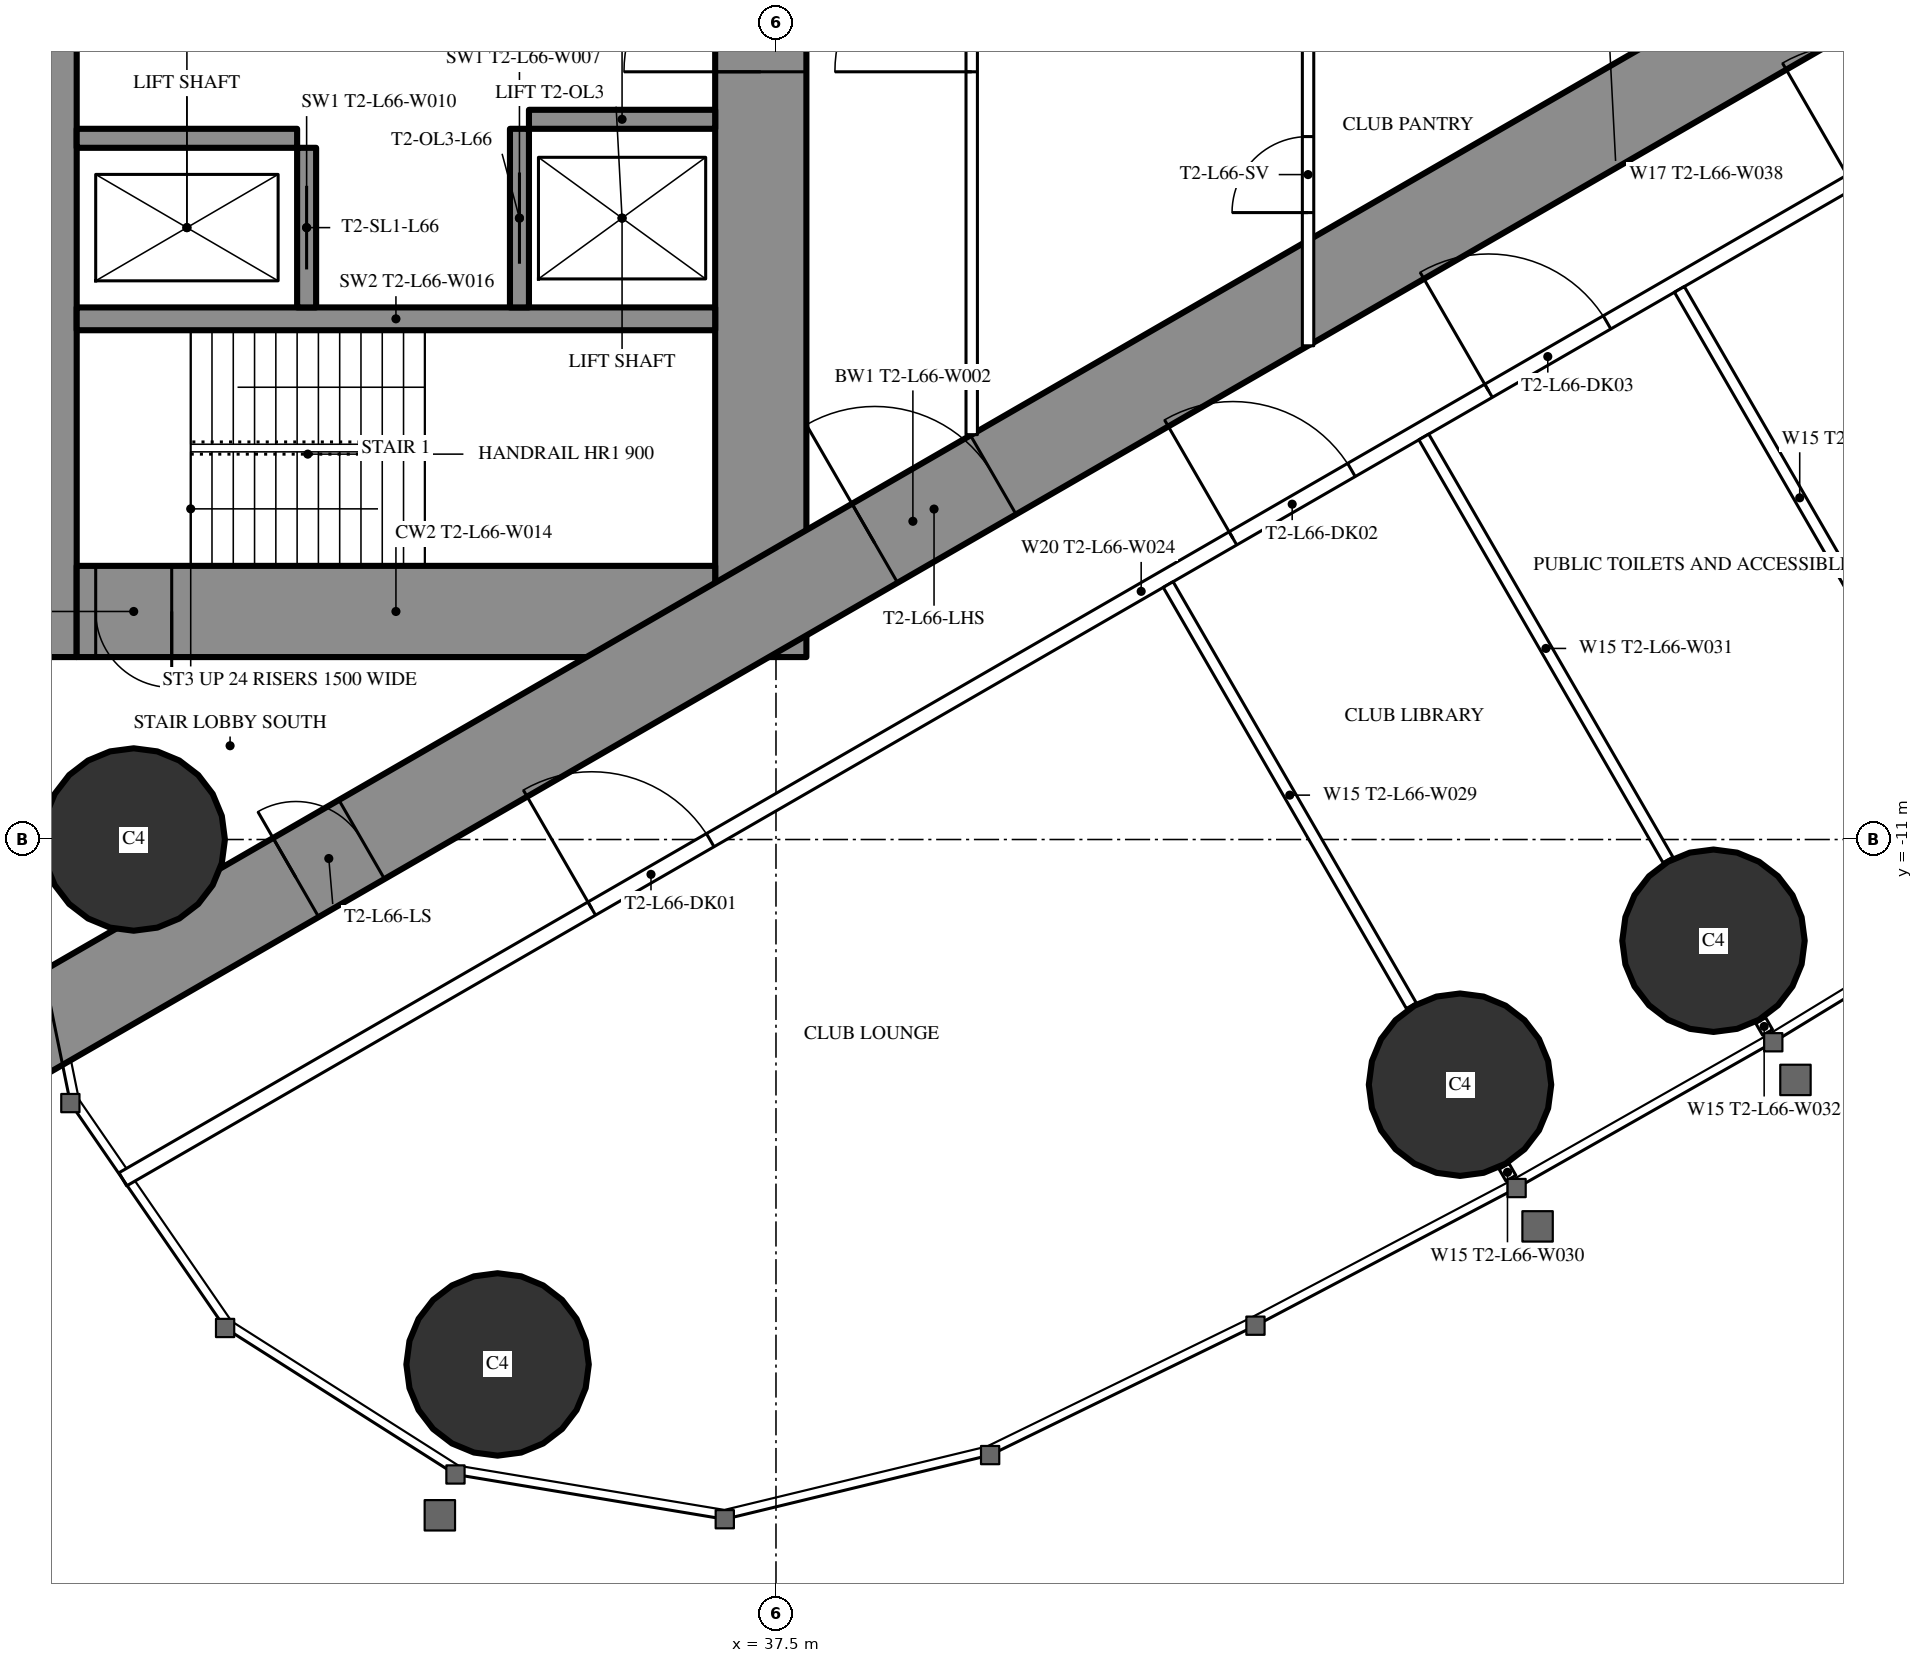
"""IFC4 building model, lengths in metres.
Left out: names, types, materials, properties, quantities, classifications, styles, units other than length and angle.
Written with IfcOpenShell. Run it as: python <this file> out.ifc"""

import sys

from ifc_helpers import new_model, si_unit, direction, frame, frame_2d, origin, origin_2d, place, context, subcontext, project, spatial, rectangle, circle, extrude, element, fill, save


model = new_model("IFC4")
c1 = context("Model", 3, precision=1e-05, world=origin(), true_north=direction((0.0, 1.0)))
c2 = subcontext(c1, "Body", "Model", "MODEL_VIEW")
j1 = project(units=[si_unit("LENGTHUNIT", "METRE"), si_unit("PLANEANGLEUNIT", "RADIAN")], contexts=[c1])
p1 = place(None, origin())
s1 = spatial("IfcSite", under=j1, at=p1, CompositionType="ELEMENT")
p2 = place(p1, origin())
s2 = spatial("IfcBuilding", under=s1, at=p2, CompositionType="ELEMENT")
p3 = place(p2, frame((0.0, 0.0, 247.7)))
s3 = spatial("IfcBuildingStorey", under=s2, at=p3, CompositionType="ELEMENT", Elevation=247.7)
for number, where, z_axis, x_axis in (
    (1, (33.837, -17.906, 0.0), (0.0, 0.0, 1.0), (1.0, 0.0, 0.0)),
    (2, (29.05, -11.0, 0.0), (0.0, 0.0, 1.0), (1.0, 0.0, 0.0)),
    (3, (46.499, -14.226, 0.0), (0.0, 0.0, 1.0), (1.0, 0.0, 0.0)),
    (4, (49.834, -12.332, 0.0), (0.0, 0.0, 1.0), (1.0, 0.0, 0.0)),
):
    element("IfcColumn", number, at=place(p3, frame(where, z_axis=z_axis, x_axis=x_axis)), inside=s3, PredefinedType="COLUMN", context=c2, shape_type="SweptSolid", body=[
        extrude(circle(Radius=1.2, at=origin_2d()), origin(), (0.0, 0.0, 1.0), 4.2),
    ])
p4 = place(p3, frame((27.9, -8.6, 0.0), z_axis=(0.0, 0.0, 1.0), x_axis=(0.0, 1.0, 0.0)))
e5 = element("IfcWall", 5, at=p4, inside=s3, PredefinedType="SHEAR", context=c2, shape_type="SweptSolid", body=[
    extrude(rectangle(XDim=17.2, YDim=0.8, at=frame_2d((8.6, 0.0))), origin(), (0.0, 0.0, 1.0), 4.2),
])
p5 = place(p4, frame((9.35, 0.0, 0.0)))
e6 = element("IfcOpeningElement", 6, at=p5, cuts=e5, PredefinedType="OPENING", context=c2, shape_type="SweptSolid", body=[
    extrude(rectangle(XDim=0.9, YDim=2.2, at=frame_2d((0.45, 1.1))), frame((0.0, 0.41, 0.0), z_axis=(0.0, -1.0, 0.0), x_axis=(1.0, 0.0, 0.0)), (0.0, 0.0, 1.0), 0.82),
])
p6 = place(p3, frame((37.3, -8.6, 0.0), z_axis=(0.0, 0.0, 1.0), x_axis=(0.0, 1.0, 0.0)))
e7 = element("IfcWall", 7, at=p6, inside=s3, PredefinedType="SHEAR", context=c2, shape_type="SweptSolid", body=[
    extrude(rectangle(XDim=17.2, YDim=1.2, at=frame_2d((8.6, 0.0))), origin(), (0.0, 0.0, 1.0), 4.2),
])
p7 = place(p6, frame((7.7, 0.0, 0.0)))
e8 = element("IfcOpeningElement", 8, at=p7, cuts=e7, PredefinedType="OPENING", context=c2, shape_type="SweptSolid", body=[
    extrude(rectangle(XDim=1.8, YDim=2.2, at=frame_2d((0.9, 1.1))), frame((0.0, 0.61, 0.0), z_axis=(0.0, -1.0, 0.0), x_axis=(1.0, 0.0, 0.0)), (0.0, 0.0, 1.0), 1.22),
])
p8 = place(p3, frame((28.3, -8.0, 0.0), z_axis=(0.0, 0.0, 1.0), x_axis=(1.0, 0.0, 0.0)))
e9 = element("IfcWall", 9, at=p8, inside=s3, PredefinedType="SHEAR", context=c2, shape_type="SweptSolid", body=[
    extrude(rectangle(XDim=8.4, YDim=1.2, at=frame_2d((4.2, 0.0))), origin(), (0.0, 0.0, 1.0), 4.2),
])
p9 = place(p8, frame((0.25, 0.0, 0.0)))
e10 = element("IfcOpeningElement", 10, at=p9, cuts=e9, PredefinedType="OPENING", context=c2, shape_type="SweptSolid", body=[
    extrude(rectangle(XDim=1.0, YDim=2.2, at=frame_2d((0.5, 1.1))), frame((0.0, 0.61, 0.0), z_axis=(0.0, -1.0, 0.0), x_axis=(1.0, 0.0, 0.0)), (0.0, 0.0, 1.0), 1.22),
])
p10 = place(p3, frame((28.3, -4.15, 0.0), z_axis=(0.0, 0.0, 1.0), x_axis=(1.0, 0.0, 0.0)))
e11 = element("IfcWall", 11, at=p10, inside=s3, PredefinedType="SHEAR", context=c2, shape_type="SweptSolid", body=[
    extrude(rectangle(XDim=8.4, YDim=0.3, at=frame_2d((4.2, 0.0))), origin(), (0.0, 0.0, 1.0), 4.2),
])
p11 = place(p3, frame((31.325, -4.0, 0.0), z_axis=(0.0, 0.0, 1.0), x_axis=(0.0, 1.0, 0.0)))
e12 = element("IfcWall", 12, at=p11, inside=s3, PredefinedType="SHEAR", context=c2, shape_type="SweptSolid", body=[
    extrude(rectangle(XDim=2.1, YDim=0.25, at=frame_2d((1.05, 0.0))), origin(), (0.0, 0.0, 1.0), 4.2),
])
p12 = place(p11, frame((0.5, 0.0, 0.0)))
e13 = element("IfcOpeningElement", 13, at=p12, cuts=e12, PredefinedType="OPENING", context=c2, shape_type="SweptSolid", body=[
    extrude(rectangle(XDim=1.1, YDim=2.2, at=frame_2d((0.55, 1.1))), frame((0.0, 0.135, 0.0), z_axis=(0.0, -1.0, 0.0), x_axis=(1.0, 0.0, 0.0)), (0.0, 0.0, 1.0), 0.27),
])
p13 = place(p3, frame((34.125, -4.0, 0.0), z_axis=(0.0, 0.0, 1.0), x_axis=(0.0, 1.0, 0.0)))
e14 = element("IfcWall", 14, at=p13, inside=s3, PredefinedType="SHEAR", context=c2, shape_type="SweptSolid", body=[
    extrude(rectangle(XDim=2.35, YDim=0.25, at=frame_2d((1.175, 0.0))), origin(), (0.0, 0.0, 1.0), 4.2),
])
p14 = place(p13, frame((0.575, 0.0, 0.0)))
e15 = element("IfcOpeningElement", 15, at=p14, cuts=e14, PredefinedType="OPENING", context=c2, shape_type="SweptSolid", body=[
    extrude(rectangle(XDim=1.2, YDim=2.2, at=frame_2d((0.6, 1.1))), frame((0.0, 0.135, 0.0), z_axis=(0.0, -1.0, 0.0), x_axis=(1.0, 0.0, 0.0)), (0.0, 0.0, 1.0), 0.27),
])
p15 = place(p3, frame((28.3, -1.775, 0.0), z_axis=(0.0, 0.0, 1.0), x_axis=(1.0, 0.0, 0.0)))
e16 = element("IfcWall", 16, at=p15, inside=s3, PredefinedType="SHEAR", context=c2, shape_type="SweptSolid", body=[
    extrude(rectangle(XDim=2.9, YDim=0.25, at=frame_2d((1.45, 0.0))), origin(), (0.0, 0.0, 1.0), 4.2),
])
p16 = place(p3, frame((34.25, -1.525, 0.0), z_axis=(0.0, 0.0, 1.0), x_axis=(1.0, 0.0, 0.0)))
e17 = element("IfcWall", 17, at=p16, inside=s3, PredefinedType="SHEAR", context=c2, shape_type="SweptSolid", body=[
    extrude(rectangle(XDim=2.45, YDim=0.25, at=frame_2d((1.225, 0.0))), origin(), (0.0, 0.0, 1.0), 4.2),
])
p17 = place(p3, frame((27.2, -13.8, 0.0), z_axis=(0.0, 0.0, 1.0), x_axis=(0.866027159892, 0.499996958321, 0.0)))
e18 = element("IfcWall", 18, at=p17, inside=s3, PredefinedType="SHEAR", context=c2, shape_type="SweptSolid", body=[
    extrude(rectangle(XDim=27.947, YDim=1.2, at=frame_2d((13.973, 0.0))), origin(), (0.0, 0.0, 1.0), 4.2),
])
p18 = place(p17, frame((4.6, 0.0, 0.0)))
e19 = element("IfcOpeningElement", 19, at=p18, cuts=e18, PredefinedType="OPENING", context=c2, shape_type="SweptSolid", body=[
    extrude(rectangle(XDim=1.0, YDim=2.2, at=frame_2d((0.5, 1.1))), frame((0.0, 0.61, 0.0), z_axis=(0.0, -1.0, 0.0), x_axis=(1.0, 0.0, 0.0)), (0.0, 0.0, 1.0), 1.22),
])
p19 = place(p17, frame((13.395, 0.0, 0.0)))
e20 = element("IfcOpeningElement", 20, at=p19, cuts=e18, PredefinedType="OPENING", context=c2, shape_type="SweptSolid", body=[
    extrude(rectangle(XDim=1.8, YDim=2.2, at=frame_2d((0.9, 1.1))), frame((0.0, 0.61, 0.0), z_axis=(0.0, -1.0, 0.0), x_axis=(1.0, 0.0, 0.0)), (0.0, 0.0, 1.0), 1.22),
])
p20 = place(p3, frame((28.907, -15.47, 0.0), z_axis=(0.0, 0.0, 1.0), x_axis=(0.866023700353, 0.500002950419, 0.0)))
e21 = element("IfcWall", 21, at=p20, inside=s3, PredefinedType="PARTITIONING", context=c2, shape_type="SweptSolid", body=[
    extrude(rectangle(XDim=30.941, YDim=0.2, at=frame_2d((15.47, 0.0))), origin(), (0.0, 0.0, 1.0), 3.95),
])
p21 = place(p20, frame((7.124, 0.0, 0.0)))
e22 = element("IfcOpeningElement", 22, at=p21, cuts=e21, PredefinedType="OPENING", context=c2, shape_type="SweptSolid", body=[
    extrude(rectangle(XDim=1.8, YDim=2.2, at=frame_2d((0.9, 1.1))), frame((0.0, 0.11, 0.0), z_axis=(0.0, -1.0, 0.0), x_axis=(1.0, 0.0, 0.0)), (0.0, 0.0, 1.0), 0.22),
])
p22 = place(p20, frame((16.865, 0.0, 0.0)))
e23 = element("IfcOpeningElement", 23, at=p22, cuts=e21, PredefinedType="OPENING", context=c2, shape_type="SweptSolid", body=[
    extrude(rectangle(XDim=1.8, YDim=2.2, at=frame_2d((0.9, 1.1))), frame((0.0, 0.11, 0.0), z_axis=(0.0, -1.0, 0.0), x_axis=(1.0, 0.0, 0.0)), (0.0, 0.0, 1.0), 0.22),
])
p23 = place(p20, frame((20.748, 0.0, 0.0)))
e24 = element("IfcOpeningElement", 24, at=p23, cuts=e21, PredefinedType="OPENING", context=c2, shape_type="SweptSolid", body=[
    extrude(rectangle(XDim=1.8, YDim=2.2, at=frame_2d((0.9, 1.1))), frame((0.0, 0.11, 0.0), z_axis=(0.0, -1.0, 0.0), x_axis=(1.0, 0.0, 0.0)), (0.0, 0.0, 1.0), 0.22),
])
p24 = place(p20, frame((26.252, 0.0, 0.0)))
e25 = element("IfcOpeningElement", 25, at=p24, cuts=e21, PredefinedType="OPENING", context=c2, shape_type="SweptSolid", body=[
    extrude(rectangle(XDim=1.8, YDim=2.2, at=frame_2d((0.9, 1.1))), frame((0.0, 0.11, 0.0), z_axis=(0.0, -1.0, 0.0), x_axis=(1.0, 0.0, 0.0)), (0.0, 0.0, 1.0), 0.22),
])
p25 = place(p3, frame((42.66, -7.646, 0.0), z_axis=(0.0, 0.0, 1.0), x_axis=(0.499996592859, -0.866027370889, 0.0)))
e26 = element("IfcWall", 26, at=p25, inside=s3, PredefinedType="PARTITIONING", context=c2, shape_type="SweptSolid", body=[
    extrude(rectangle(XDim=6.398, YDim=0.15, at=frame_2d((3.199, 0.0))), origin(), (0.0, 0.0, 1.0), 3.05),
])
p26 = place(p3, frame((47.079, -15.3, 0.0), z_axis=(0.0, 0.0, 1.0), x_axis=(0.499212083968, -0.866479829667, 0.0)))
e27 = element("IfcWall", 27, at=p26, inside=s3, PredefinedType="PARTITIONING", context=c2, shape_type="SweptSolid", body=[
    extrude(rectangle(XDim=0.179, YDim=0.15, at=frame_2d((0.09, 0.0))), origin(), (0.0, 0.0, 1.0), 3.05),
])
p27 = place(p3, frame((46.023, -5.704, 0.0), z_axis=(0.0, 0.0, 1.0), x_axis=(0.499984478165, -0.866034365135, 0.0)))
e28 = element("IfcWall", 28, at=p27, inside=s3, PredefinedType="PARTITIONING", context=c2, shape_type="SweptSolid", body=[
    extrude(rectangle(XDim=6.426, YDim=0.15, at=frame_2d((3.213, 0.0))), origin(), (0.0, 0.0, 1.0), 3.05),
])
p28 = place(p3, frame((50.456, -13.382, 0.0), z_axis=(0.0, 0.0, 1.0), x_axis=(0.500661834965, -0.865642955848, 0.0)))
e29 = element("IfcWall", 29, at=p28, inside=s3, PredefinedType="PARTITIONING", context=c2, shape_type="SweptSolid", body=[
    extrude(rectangle(XDim=0.18, YDim=0.15, at=frame_2d((0.09, 0.0))), origin(), (0.0, 0.0, 1.0), 3.05),
])
p29 = place(p3, frame((49.385, -3.763, 0.0), z_axis=(0.0, 0.0, 1.0), x_axis=(0.499999447814, -0.866025722589, 0.0)))
e30 = element("IfcWall", 30, at=p29, inside=s3, PredefinedType="PARTITIONING", context=c2, shape_type="SweptSolid", body=[
    extrude(rectangle(XDim=6.333, YDim=0.15, at=frame_2d((3.166, 0.0))), origin(), (0.0, 0.0, 1.0), 3.05),
])
p30 = place(p3, frame((40.075, -5.674, 0.0), z_axis=(0.0, 0.0, 1.0), x_axis=(0.0, 1.0, 0.0)))
e31 = element("IfcWall", 31, at=p30, inside=s3, PredefinedType="PARTITIONING", context=c2, shape_type="SweptSolid", body=[
    extrude(rectangle(XDim=11.348, YDim=0.15, at=frame_2d((5.674, 0.0))), origin(), (0.0, 0.0, 1.0), 3.95),
])
p31 = place(p30, frame((4.774, 0.0, 0.0)))
e32 = element("IfcOpeningElement", 32, at=p31, cuts=e31, PredefinedType="OPENING", context=c2, shape_type="SweptSolid", body=[
    extrude(rectangle(XDim=1.8, YDim=2.2, at=frame_2d((0.9, 1.1))), frame((0.0, 0.085, 0.0), z_axis=(0.0, -1.0, 0.0), x_axis=(1.0, 0.0, 0.0)), (0.0, 0.0, 1.0), 0.17),
])
p32 = place(p3, frame((44.5, -4.505, 0.0), z_axis=(0.0, 0.0, 1.0), x_axis=(0.0, 1.0, 0.0)))
e33 = element("IfcWall", 33, at=p32, inside=s3, PredefinedType="PARTITIONING", context=c2, shape_type="SweptSolid", body=[
    extrude(rectangle(XDim=9.009, YDim=0.15, at=frame_2d((4.505, 0.0))), origin(), (0.0, 0.0, 1.0), 3.95),
])
p33 = place(p32, frame((1.752, 0.0, 0.0)))
e34 = element("IfcOpeningElement", 34, at=p33, cuts=e33, PredefinedType="OPENING", context=c2, shape_type="SweptSolid", body=[
    extrude(rectangle(XDim=1.0, YDim=2.2, at=frame_2d((0.5, 1.1))), frame((0.0, 0.085, 0.0), z_axis=(0.0, -1.0, 0.0), x_axis=(1.0, 0.0, 0.0)), (0.0, 0.0, 1.0), 0.17),
])
p34 = place(p32, frame((6.257, 0.0, 0.0)))
e35 = element("IfcOpeningElement", 35, at=p34, cuts=e33, PredefinedType="OPENING", context=c2, shape_type="SweptSolid", body=[
    extrude(rectangle(XDim=1.0, YDim=2.2, at=frame_2d((0.5, 1.1))), frame((0.0, 0.085, 0.0), z_axis=(0.0, -1.0, 0.0), x_axis=(1.0, 0.0, 0.0)), (0.0, 0.0, 1.0), 0.17),
])
p35 = place(p21, origin())
e36 = element("IfcDoor", 36, at=p35, inside=s3, OperationType="DOUBLE_DOOR_SINGLE_SWING", PredefinedType="DOOR", context=c2, shape_type="SweptSolid", body=[
    extrude(rectangle(XDim=1.8, YDim=2.2, at=frame_2d((0.9, 1.1))), frame((0.0, 0.025, 0.0), z_axis=(0.0, -1.0, 0.0), x_axis=(1.0, 0.0, 0.0)), (0.0, 0.0, 1.0), 0.05),
])
fill(e22, e36)
p36 = place(p22, origin())
e37 = element("IfcDoor", 37, at=p36, inside=s3, OperationType="DOUBLE_DOOR_SINGLE_SWING", PredefinedType="DOOR", context=c2, shape_type="SweptSolid", body=[
    extrude(rectangle(XDim=1.8, YDim=2.2, at=frame_2d((0.9, 1.1))), frame((0.0, 0.025, 0.0), z_axis=(0.0, -1.0, 0.0), x_axis=(1.0, 0.0, 0.0)), (0.0, 0.0, 1.0), 0.05),
])
fill(e23, e37)
p37 = place(p23, origin())
e38 = element("IfcDoor", 38, at=p37, inside=s3, OperationType="DOUBLE_DOOR_SINGLE_SWING", PredefinedType="DOOR", context=c2, shape_type="SweptSolid", body=[
    extrude(rectangle(XDim=1.8, YDim=2.2, at=frame_2d((0.9, 1.1))), frame((0.0, 0.025, 0.0), z_axis=(0.0, -1.0, 0.0), x_axis=(1.0, 0.0, 0.0)), (0.0, 0.0, 1.0), 0.05),
])
fill(e24, e38)
p38 = place(p31, origin())
e39 = element("IfcDoor", 39, at=p38, inside=s3, OperationType="DOUBLE_DOOR_SINGLE_SWING", PredefinedType="DOOR", context=c2, shape_type="SweptSolid", body=[
    extrude(rectangle(XDim=1.8, YDim=2.2, at=frame_2d((0.9, 1.1))), frame((0.0, 0.025, 0.0), z_axis=(0.0, -1.0, 0.0), x_axis=(1.0, 0.0, 0.0)), (0.0, 0.0, 1.0), 0.05),
])
fill(e32, e39)
p39 = place(p33, origin())
e40 = element("IfcDoor", 40, at=p39, inside=s3, OperationType="SINGLE_SWING_LEFT", PredefinedType="DOOR", context=c2, shape_type="SweptSolid", body=[
    extrude(rectangle(XDim=1.0, YDim=2.2, at=frame_2d((0.5, 1.1))), frame((0.0, 0.025, 0.0), z_axis=(0.0, -1.0, 0.0), x_axis=(1.0, 0.0, 0.0)), (0.0, 0.0, 1.0), 0.05),
])
fill(e34, e40)
p40 = place(p18, origin())
e41 = element("IfcDoor", 41, at=p40, inside=s3, OperationType="SINGLE_SWING_LEFT", PredefinedType="DOOR", context=c2, shape_type="SweptSolid", body=[
    extrude(rectangle(XDim=1.0, YDim=2.2, at=frame_2d((0.5, 1.1))), frame((0.0, 0.025, 0.0), z_axis=(0.0, -1.0, 0.0), x_axis=(1.0, 0.0, 0.0)), (0.0, 0.0, 1.0), 0.05),
])
fill(e19, e41)
p41 = place(p19, origin())
e42 = element("IfcDoor", 42, at=p41, inside=s3, OperationType="DOUBLE_DOOR_SINGLE_SWING", PredefinedType="DOOR", context=c2, shape_type="SweptSolid", body=[
    extrude(rectangle(XDim=1.8, YDim=2.2, at=frame_2d((0.9, 1.1))), frame((0.0, 0.025, 0.0), z_axis=(0.0, -1.0, 0.0), x_axis=(1.0, 0.0, 0.0)), (0.0, 0.0, 1.0), 0.05),
])
fill(e20, e42)
p42 = place(p7, origin())
e43 = element("IfcDoor", 43, at=p42, inside=s3, OperationType="DOUBLE_DOOR_SINGLE_SWING", PredefinedType="DOOR", context=c2, shape_type="SweptSolid", body=[
    extrude(rectangle(XDim=1.8, YDim=2.2, at=frame_2d((0.9, 1.1))), frame((0.0, 0.025, 0.0), z_axis=(0.0, -1.0, 0.0), x_axis=(1.0, 0.0, 0.0)), (0.0, 0.0, 1.0), 0.05),
])
fill(e8, e43)
p43 = place(p9, origin())
e44 = element("IfcDoor", 44, at=p43, inside=s3, OperationType="SINGLE_SWING_RIGHT", PredefinedType="DOOR", context=c2, shape_type="SweptSolid", body=[
    extrude(rectangle(XDim=1.0, YDim=2.2, at=frame_2d((0.5, 1.1))), frame((0.0, 0.025, 0.0), z_axis=(0.0, -1.0, 0.0), x_axis=(1.0, 0.0, 0.0)), (0.0, 0.0, 1.0), 0.05),
])
fill(e10, e44)
p44 = place(p12, origin())
e45 = element("IfcDoor", 45, at=p44, inside=s3, OperationType="SLIDING_TO_LEFT", PredefinedType="USERDEFINED", context=c2, shape_type="SweptSolid", body=[
    extrude(rectangle(XDim=1.1, YDim=2.2, at=frame_2d((0.55, 1.1))), frame((0.0, 0.025, 0.0), z_axis=(0.0, -1.0, 0.0), x_axis=(1.0, 0.0, 0.0)), (0.0, 0.0, 1.0), 0.05),
])
fill(e13, e45)
p45 = place(p14, origin())
e46 = element("IfcDoor", 46, at=p45, inside=s3, OperationType="DOUBLE_DOOR_SLIDING", PredefinedType="USERDEFINED", context=c2, shape_type="SweptSolid", body=[
    extrude(rectangle(XDim=1.2, YDim=2.2, at=frame_2d((0.6, 1.1))), frame((0.0, 0.025, 0.0), z_axis=(0.0, -1.0, 0.0), x_axis=(1.0, 0.0, 0.0)), (0.0, 0.0, 1.0), 0.05),
])
fill(e15, e46)
save(model, sys.argv[1])
